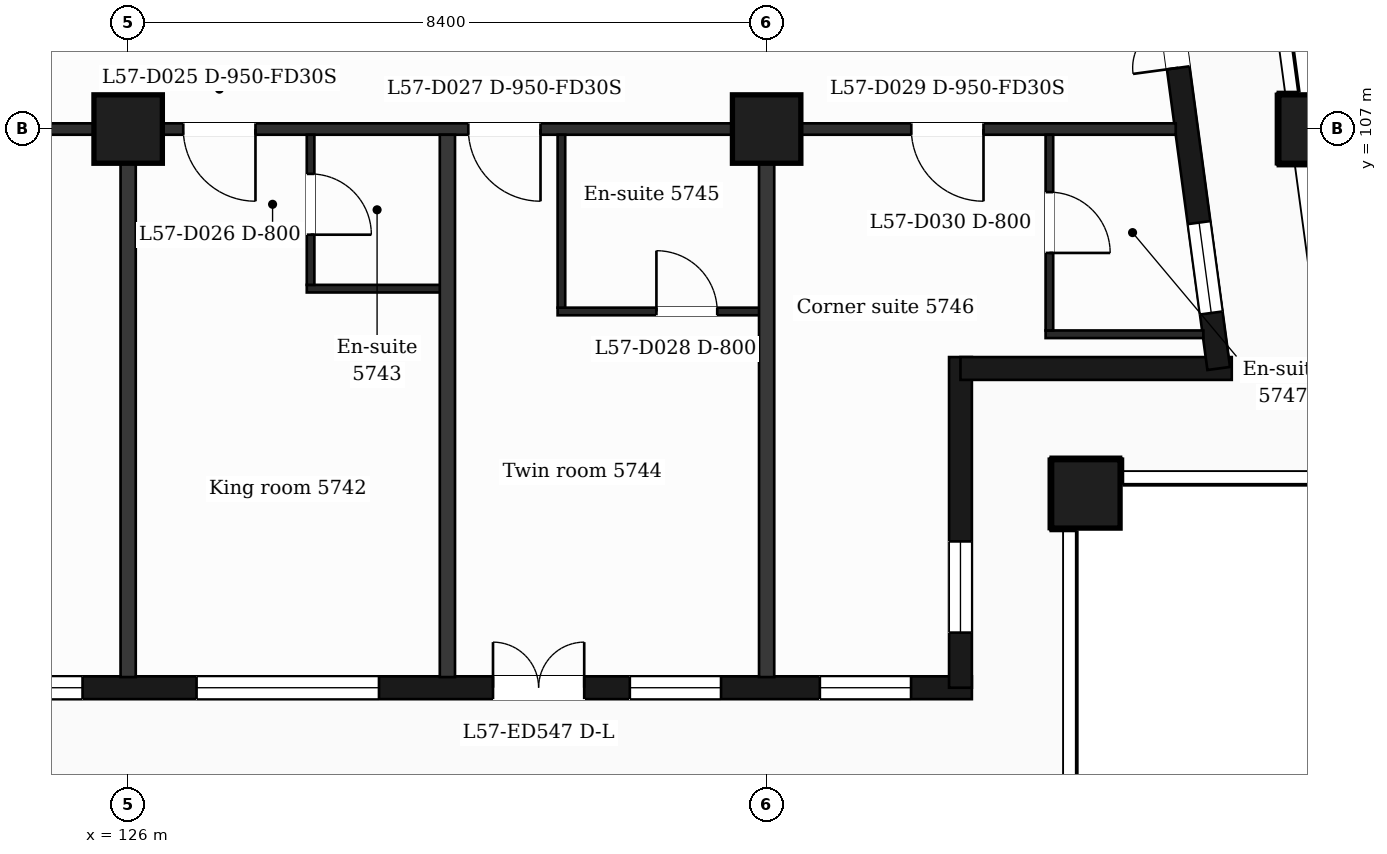
"""IFC4 building model, lengths in metres.
Left out: names, types, materials, properties, quantities, classifications, styles, units other than length and angle.
Written with IfcOpenShell. Run it as: python <this file> out.ifc"""

import sys

from ifc_helpers import new_model, si_unit, direction, frame, frame_2d, origin, origin_2d, place, context, subcontext, project, spatial, rectangle, extrude, element, fill, save


model = new_model("IFC4")
c1 = context("Model", 3, precision=1e-05, world=origin(), true_north=direction((0.0, 1.0)))
c2 = subcontext(c1, "Body", "Model", "MODEL_VIEW")
j1 = project(units=[si_unit("LENGTHUNIT", "METRE"), si_unit("PLANEANGLEUNIT", "RADIAN")], contexts=[c1])
p1 = place(None, origin())
s1 = spatial("IfcSite", under=j1, at=p1, CompositionType="ELEMENT")
p2 = place(p1, origin())
s2 = spatial("IfcBuilding", under=s1, at=p2, CompositionType="ELEMENT")
p3 = place(p2, frame((0.0, 0.0, 235.5)))
s3 = spatial("IfcBuildingStorey", under=s2, at=p3, CompositionType="ELEMENT", Elevation=235.5)
for number, where, z_axis, x_axis in (
    (1, (138.6, 102.2, 0.0), (0.0, 0.0, 1.0), (1.0, 0.0, 0.0)),
    (2, (126.0, 107.0, 0.0), (0.0, 0.0, 1.0), (1.0, 0.0, 0.0)),
    (3, (134.4, 107.0, 0.0), (0.0, 0.0, 1.0), (1.0, 0.0, 0.0)),
    (4, (141.588, 107.0, 0.0), (0.0, 0.0, 1.0), (1.0, 0.0, 0.0)),
):
    element("IfcColumn", number, at=place(p3, frame(where, z_axis=z_axis, x_axis=x_axis)), inside=s3, PredefinedType="COLUMN", context=c2, shape_type="SweptSolid", body=[
        extrude(rectangle(XDim=0.9, YDim=0.9, at=origin_2d()), origin(), (0.0, 0.0, 1.0), 3.7),
    ])
p4 = place(p3, frame((89.85, 99.65, 0.0), z_axis=(0.0, 0.0, 1.0), x_axis=(1.0, 0.0, 0.0)))
e5 = element("IfcWall", 5, at=p4, inside=s3, PredefinedType="SOLIDWALL", context=c2, shape_type="SweptSolid", body=[
    extrude(rectangle(XDim=47.25, YDim=0.3, at=frame_2d((23.625, 0.0))), origin(), (0.0, 0.0, 1.0), 3.38),
])
p5 = place(p4, frame((0.725, 0.0, 0.9)))
e6 = element("IfcOpeningElement", 6, at=p5, cuts=e5, PredefinedType="OPENING", context=c2, shape_type="SweptSolid", body=[
    extrude(rectangle(XDim=1.2, YDim=2.1, at=frame_2d((0.6, 1.05))), frame((0.0, 0.16, 0.0), z_axis=(0.0, -1.0, 0.0), x_axis=(1.0, 0.0, 0.0)), (0.0, 0.0, 1.0), 0.32),
])
p6 = place(p4, frame((3.45, 0.0, 0.9)))
e7 = element("IfcOpeningElement", 7, at=p6, cuts=e5, PredefinedType="OPENING", context=c2, shape_type="SweptSolid", body=[
    extrude(rectangle(XDim=2.4, YDim=2.1, at=frame_2d((1.2, 1.05))), frame((0.0, 0.16, 0.0), z_axis=(0.0, -1.0, 0.0), x_axis=(1.0, 0.0, 0.0)), (0.0, 0.0, 1.0), 0.32),
])
p7 = place(p4, frame((7.65, 0.0, 0.9)))
e8 = element("IfcOpeningElement", 8, at=p7, cuts=e5, PredefinedType="OPENING", context=c2, shape_type="SweptSolid", body=[
    extrude(rectangle(XDim=2.4, YDim=2.1, at=frame_2d((1.2, 1.05))), frame((0.0, 0.16, 0.0), z_axis=(0.0, -1.0, 0.0), x_axis=(1.0, 0.0, 0.0)), (0.0, 0.0, 1.0), 0.32),
])
p8 = place(p4, frame((11.85, 0.0, 0.9)))
e9 = element("IfcOpeningElement", 9, at=p8, cuts=e5, PredefinedType="OPENING", context=c2, shape_type="SweptSolid", body=[
    extrude(rectangle(XDim=2.4, YDim=2.1, at=frame_2d((1.2, 1.05))), frame((0.0, 0.16, 0.0), z_axis=(0.0, -1.0, 0.0), x_axis=(1.0, 0.0, 0.0)), (0.0, 0.0, 1.0), 0.32),
])
p9 = place(p4, frame((16.05, 0.0, 0.9)))
e10 = element("IfcOpeningElement", 10, at=p9, cuts=e5, PredefinedType="OPENING", context=c2, shape_type="SweptSolid", body=[
    extrude(rectangle(XDim=2.4, YDim=2.1, at=frame_2d((1.2, 1.05))), frame((0.0, 0.16, 0.0), z_axis=(0.0, -1.0, 0.0), x_axis=(1.0, 0.0, 0.0)), (0.0, 0.0, 1.0), 0.32),
])
p10 = place(p4, frame((20.25, 0.0, 0.9)))
e11 = element("IfcOpeningElement", 11, at=p10, cuts=e5, PredefinedType="OPENING", context=c2, shape_type="SweptSolid", body=[
    extrude(rectangle(XDim=2.4, YDim=2.1, at=frame_2d((1.2, 1.05))), frame((0.0, 0.16, 0.0), z_axis=(0.0, -1.0, 0.0), x_axis=(1.0, 0.0, 0.0)), (0.0, 0.0, 1.0), 0.32),
])
p11 = place(p4, frame((25.05, 0.0, 0.9)))
e12 = element("IfcOpeningElement", 12, at=p11, cuts=e5, PredefinedType="OPENING", context=c2, shape_type="SweptSolid", body=[
    extrude(rectangle(XDim=1.2, YDim=2.1, at=frame_2d((0.6, 1.05))), frame((0.0, 0.16, 0.0), z_axis=(0.0, -1.0, 0.0), x_axis=(1.0, 0.0, 0.0)), (0.0, 0.0, 1.0), 0.32),
])
p12 = place(p4, frame((29.25, 0.0, 0.9)))
e13 = element("IfcOpeningElement", 13, at=p12, cuts=e5, PredefinedType="OPENING", context=c2, shape_type="SweptSolid", body=[
    extrude(rectangle(XDim=1.2, YDim=2.1, at=frame_2d((0.6, 1.05))), frame((0.0, 0.16, 0.0), z_axis=(0.0, -1.0, 0.0), x_axis=(1.0, 0.0, 0.0)), (0.0, 0.0, 1.0), 0.32),
])
p13 = place(p4, frame((32.55, 0.0, 0.0)))
e14 = element("IfcOpeningElement", 14, at=p13, cuts=e5, PredefinedType="OPENING", context=c2, shape_type="SweptSolid", body=[
    extrude(rectangle(XDim=1.2, YDim=2.4, at=frame_2d((0.6, 1.2))), frame((0.0, 0.16, 0.0), z_axis=(0.0, -1.0, 0.0), x_axis=(1.0, 0.0, 0.0)), (0.0, 0.0, 1.0), 0.32),
])
p14 = place(p4, frame((34.35, 0.0, 0.9)))
e15 = element("IfcOpeningElement", 15, at=p14, cuts=e5, PredefinedType="OPENING", context=c2, shape_type="SweptSolid", body=[
    extrude(rectangle(XDim=1.2, YDim=2.1, at=frame_2d((0.6, 1.05))), frame((0.0, 0.16, 0.0), z_axis=(0.0, -1.0, 0.0), x_axis=(1.0, 0.0, 0.0)), (0.0, 0.0, 1.0), 0.32),
])
p15 = place(p4, frame((37.05, 0.0, 0.9)))
e16 = element("IfcOpeningElement", 16, at=p15, cuts=e5, PredefinedType="OPENING", context=c2, shape_type="SweptSolid", body=[
    extrude(rectangle(XDim=2.4, YDim=2.1, at=frame_2d((1.2, 1.05))), frame((0.0, 0.16, 0.0), z_axis=(0.0, -1.0, 0.0), x_axis=(1.0, 0.0, 0.0)), (0.0, 0.0, 1.0), 0.32),
])
p16 = place(p4, frame((40.95, 0.0, 0.0)))
e17 = element("IfcOpeningElement", 17, at=p16, cuts=e5, PredefinedType="OPENING", context=c2, shape_type="SweptSolid", body=[
    extrude(rectangle(XDim=1.2, YDim=2.4, at=frame_2d((0.6, 1.2))), frame((0.0, 0.16, 0.0), z_axis=(0.0, -1.0, 0.0), x_axis=(1.0, 0.0, 0.0)), (0.0, 0.0, 1.0), 0.32),
])
p17 = place(p4, frame((42.75, 0.0, 0.9)))
e18 = element("IfcOpeningElement", 18, at=p17, cuts=e5, PredefinedType="OPENING", context=c2, shape_type="SweptSolid", body=[
    extrude(rectangle(XDim=1.2, YDim=2.1, at=frame_2d((0.6, 1.05))), frame((0.0, 0.16, 0.0), z_axis=(0.0, -1.0, 0.0), x_axis=(1.0, 0.0, 0.0)), (0.0, 0.0, 1.0), 0.32),
])
p18 = place(p4, frame((45.25, 0.0, 0.9)))
e19 = element("IfcOpeningElement", 19, at=p18, cuts=e5, PredefinedType="OPENING", context=c2, shape_type="SweptSolid", body=[
    extrude(rectangle(XDim=1.2, YDim=2.1, at=frame_2d((0.6, 1.05))), frame((0.0, 0.16, 0.0), z_axis=(0.0, -1.0, 0.0), x_axis=(1.0, 0.0, 0.0)), (0.0, 0.0, 1.0), 0.32),
])
p19 = place(p3, frame((136.95, 99.65, 0.0), z_axis=(0.0, 0.0, 1.0), x_axis=(0.0, 1.0, 0.0)))
e20 = element("IfcWall", 20, at=p19, inside=s3, PredefinedType="SOLIDWALL", context=c2, shape_type="SweptSolid", body=[
    extrude(rectangle(XDim=4.35, YDim=0.3, at=frame_2d((2.175, 0.0))), origin(), (0.0, 0.0, 1.0), 3.38),
])
p20 = place(p19, frame((0.725, 0.0, 0.9)))
e21 = element("IfcOpeningElement", 21, at=p20, cuts=e20, PredefinedType="OPENING", context=c2, shape_type="SweptSolid", body=[
    extrude(rectangle(XDim=1.2, YDim=2.1, at=frame_2d((0.6, 1.05))), frame((0.0, 0.16, 0.0), z_axis=(0.0, -1.0, 0.0), x_axis=(1.0, 0.0, 0.0)), (0.0, 0.0, 1.0), 0.32),
])
p21 = place(p3, frame((136.95, 103.85, 0.0), z_axis=(0.0, 0.0, 1.0), x_axis=(1.0, 0.0, 0.0)))
e22 = element("IfcWall", 22, at=p21, inside=s3, PredefinedType="SOLIDWALL", context=c2, shape_type="SweptSolid", body=[
    extrude(rectangle(XDim=3.569, YDim=0.3, at=frame_2d((1.785, 0.0))), origin(), (0.0, 0.0, 1.0), 3.38),
])
p22 = place(p3, frame((140.348, 103.85, 0.0), z_axis=(0.0, 0.0, 1.0), x_axis=(-0.133431549479, 0.991058031401, 0.0)))
e23 = element("IfcWall", 23, at=p22, inside=s3, PredefinedType="SOLIDWALL", context=c2, shape_type="SweptSolid", body=[
    extrude(rectangle(XDim=6.609, YDim=0.3, at=frame_2d((3.304, 0.0))), origin(), (0.0, 0.0, 1.0), 3.38),
])
p23 = place(p22, frame((0.737, 0.0, 0.9)))
e24 = element("IfcOpeningElement", 24, at=p23, cuts=e23, PredefinedType="OPENING", context=c2, shape_type="SweptSolid", body=[
    extrude(rectangle(XDim=1.2, YDim=2.1, at=frame_2d((0.6, 1.05))), frame((0.0, 0.16, 0.0), z_axis=(0.0, -1.0, 0.0), x_axis=(1.0, 0.0, 0.0)), (0.0, 0.0, 1.0), 0.32),
])
p24 = place(p22, frame((3.991, 0.0, 0.0)))
e25 = element("IfcOpeningElement", 25, at=p24, cuts=e23, PredefinedType="OPENING", context=c2, shape_type="SweptSolid", body=[
    extrude(rectangle(XDim=1.2, YDim=2.4, at=frame_2d((0.6, 1.2))), frame((0.0, 0.16, 0.0), z_axis=(0.0, -1.0, 0.0), x_axis=(1.0, 0.0, 0.0)), (0.0, 0.0, 1.0), 0.32),
])
p25 = place(p3, frame((138.07, 104.3, 0.0), z_axis=(0.0, 0.0, 1.0), x_axis=(1.0, 0.0, 0.0)))
e26 = element("IfcWall", 26, at=p25, inside=s3, PredefinedType="PARTITIONING", context=c2, shape_type="SweptSolid", body=[
    extrude(rectangle(XDim=2.076, YDim=0.1, at=frame_2d((1.038, 0.0))), origin(), (0.0, 0.0, 1.0), 3.38),
])
p26 = place(p3, frame((131.65, 104.6, 0.0), z_axis=(0.0, 0.0, 1.0), x_axis=(1.0, 0.0, 0.0)))
e27 = element("IfcWall", 27, at=p26, inside=s3, PredefinedType="PARTITIONING", context=c2, shape_type="SweptSolid", body=[
    extrude(rectangle(XDim=2.75, YDim=0.1, at=frame_2d((1.375, 0.0))), origin(), (0.0, 0.0, 1.0), 3.38),
])
p27 = place(p26, frame((1.3, 0.0, 0.0)))
e28 = element("IfcOpeningElement", 28, at=p27, cuts=e27, PredefinedType="OPENING", context=c2, shape_type="SweptSolid", body=[
    extrude(rectangle(XDim=0.8, YDim=2.1, at=frame_2d((0.4, 1.05))), frame((0.0, 0.06, 0.0), z_axis=(0.0, -1.0, 0.0), x_axis=(1.0, 0.0, 0.0)), (0.0, 0.0, 1.0), 0.12),
])
p28 = place(p3, frame((128.35, 104.9, 0.0), z_axis=(0.0, 0.0, 1.0), x_axis=(1.0, 0.0, 0.0)))
e29 = element("IfcWall", 29, at=p28, inside=s3, PredefinedType="PARTITIONING", context=c2, shape_type="SweptSolid", body=[
    extrude(rectangle(XDim=1.85, YDim=0.1, at=frame_2d((0.925, 0.0))), origin(), (0.0, 0.0, 1.0), 3.38),
])
p29 = place(p3, frame((87.018, 107.0, 0.0), z_axis=(0.0, 0.0, 1.0), x_axis=(1.0, 0.0, 0.0)))
e30 = element("IfcWall", 30, at=p29, inside=s3, PredefinedType="PARTITIONING", context=c2, shape_type="SweptSolid", body=[
    extrude(rectangle(XDim=52.765, YDim=0.15, at=frame_2d((26.382, 0.0))), origin(), (0.0, 0.0, 1.0), 3.38),
])
p30 = place(p29, frame((0.707, 0.0, 0.0)))
e31 = element("IfcOpeningElement", 31, at=p30, cuts=e30, PredefinedType="OPENING", context=c2, shape_type="SweptSolid", body=[
    extrude(rectangle(XDim=0.95, YDim=2.1, at=frame_2d((0.475, 1.05))), frame((0.0, 0.085, 0.0), z_axis=(0.0, -1.0, 0.0), x_axis=(1.0, 0.0, 0.0)), (0.0, 0.0, 1.0), 0.17),
])
p31 = place(p29, frame((8.412, 0.0, 0.0)))
e32 = element("IfcOpeningElement", 32, at=p31, cuts=e30, PredefinedType="OPENING", context=c2, shape_type="SweptSolid", body=[
    extrude(rectangle(XDim=1.0, YDim=2.1, at=frame_2d((0.5, 1.05))), frame((0.0, 0.085, 0.0), z_axis=(0.0, -1.0, 0.0), x_axis=(1.0, 0.0, 0.0)), (0.0, 0.0, 1.0), 0.17),
])
p32 = place(p29, frame((20.482, 0.0, 0.0)))
e33 = element("IfcOpeningElement", 33, at=p32, cuts=e30, PredefinedType="OPENING", context=c2, shape_type="SweptSolid", body=[
    extrude(rectangle(XDim=1.0, YDim=2.1, at=frame_2d((0.5, 1.05))), frame((0.0, 0.085, 0.0), z_axis=(0.0, -1.0, 0.0), x_axis=(1.0, 0.0, 0.0)), (0.0, 0.0, 1.0), 0.17),
])
p33 = place(p29, frame((22.882, 0.0, 0.0)))
e34 = element("IfcOpeningElement", 34, at=p33, cuts=e30, PredefinedType="OPENING", context=c2, shape_type="SweptSolid", body=[
    extrude(rectangle(XDim=1.0, YDim=2.1, at=frame_2d((0.5, 1.05))), frame((0.0, 0.085, 0.0), z_axis=(0.0, -1.0, 0.0), x_axis=(1.0, 0.0, 0.0)), (0.0, 0.0, 1.0), 0.17),
])
p34 = place(p29, frame((32.607, 0.0, 0.0)))
e35 = element("IfcOpeningElement", 35, at=p34, cuts=e30, PredefinedType="OPENING", context=c2, shape_type="SweptSolid", body=[
    extrude(rectangle(XDim=1.0, YDim=2.1, at=frame_2d((0.5, 1.05))), frame((0.0, 0.085, 0.0), z_axis=(0.0, -1.0, 0.0), x_axis=(1.0, 0.0, 0.0)), (0.0, 0.0, 1.0), 0.17),
])
p35 = place(p29, frame((39.707, 0.0, 0.0)))
e36 = element("IfcOpeningElement", 36, at=p35, cuts=e30, PredefinedType="OPENING", context=c2, shape_type="SweptSolid", body=[
    extrude(rectangle(XDim=0.95, YDim=2.1, at=frame_2d((0.475, 1.05))), frame((0.0, 0.085, 0.0), z_axis=(0.0, -1.0, 0.0), x_axis=(1.0, 0.0, 0.0)), (0.0, 0.0, 1.0), 0.17),
])
p36 = place(p29, frame((43.457, 0.0, 0.0)))
e37 = element("IfcOpeningElement", 37, at=p36, cuts=e30, PredefinedType="OPENING", context=c2, shape_type="SweptSolid", body=[
    extrude(rectangle(XDim=0.95, YDim=2.1, at=frame_2d((0.475, 1.05))), frame((0.0, 0.085, 0.0), z_axis=(0.0, -1.0, 0.0), x_axis=(1.0, 0.0, 0.0)), (0.0, 0.0, 1.0), 0.17),
])
p37 = place(p29, frame((49.285, 0.0, 0.0)))
e38 = element("IfcOpeningElement", 38, at=p37, cuts=e30, PredefinedType="OPENING", context=c2, shape_type="SweptSolid", body=[
    extrude(rectangle(XDim=0.95, YDim=2.1, at=frame_2d((0.475, 1.05))), frame((0.0, 0.085, 0.0), z_axis=(0.0, -1.0, 0.0), x_axis=(1.0, 0.0, 0.0)), (0.0, 0.0, 1.0), 0.17),
])
p38 = place(p3, frame((126.0, 99.79, 0.0), z_axis=(0.0, 0.0, 1.0), x_axis=(0.0, 1.0, 0.0)))
e39 = element("IfcWall", 39, at=p38, inside=s3, PredefinedType="PARTITIONING", context=c2, shape_type="SweptSolid", body=[
    extrude(rectangle(XDim=7.135, YDim=0.2, at=frame_2d((3.567, 0.0))), origin(), (0.0, 0.0, 1.0), 3.38),
])
p39 = place(p3, frame((128.4, 104.95, 0.0), z_axis=(0.0, 0.0, 1.0), x_axis=(0.0, 1.0, 0.0)))
e40 = element("IfcWall", 40, at=p39, inside=s3, PredefinedType="PARTITIONING", context=c2, shape_type="SweptSolid", body=[
    extrude(rectangle(XDim=1.975, YDim=0.1, at=frame_2d((0.988, 0.0))), origin(), (0.0, 0.0, 1.0), 3.38),
])
p40 = place(p39, frame((0.66, 0.0, 0.0)))
e41 = element("IfcOpeningElement", 41, at=p40, cuts=e40, PredefinedType="OPENING", context=c2, shape_type="SweptSolid", body=[
    extrude(rectangle(XDim=0.8, YDim=2.1, at=frame_2d((0.4, 1.05))), frame((0.0, 0.06, 0.0), z_axis=(0.0, -1.0, 0.0), x_axis=(1.0, 0.0, 0.0)), (0.0, 0.0, 1.0), 0.12),
])
p41 = place(p3, frame((130.2, 99.79, 0.0), z_axis=(0.0, 0.0, 1.0), x_axis=(0.0, 1.0, 0.0)))
e42 = element("IfcWall", 42, at=p41, inside=s3, PredefinedType="PARTITIONING", context=c2, shape_type="SweptSolid", body=[
    extrude(rectangle(XDim=7.135, YDim=0.2, at=frame_2d((3.567, 0.0))), origin(), (0.0, 0.0, 1.0), 3.38),
])
p42 = place(p3, frame((131.7, 104.65, 0.0), z_axis=(0.0, 0.0, 1.0), x_axis=(0.0, 1.0, 0.0)))
e43 = element("IfcWall", 43, at=p42, inside=s3, PredefinedType="PARTITIONING", context=c2, shape_type="SweptSolid", body=[
    extrude(rectangle(XDim=2.275, YDim=0.1, at=frame_2d((1.138, 0.0))), origin(), (0.0, 0.0, 1.0), 3.38),
])
p43 = place(p3, frame((134.4, 99.79, 0.0), z_axis=(0.0, 0.0, 1.0), x_axis=(0.0, 1.0, 0.0)))
e44 = element("IfcWall", 44, at=p43, inside=s3, PredefinedType="PARTITIONING", context=c2, shape_type="SweptSolid", body=[
    extrude(rectangle(XDim=7.135, YDim=0.2, at=frame_2d((3.567, 0.0))), origin(), (0.0, 0.0, 1.0), 3.38),
])
p44 = place(p3, frame((138.12, 104.35, 0.0), z_axis=(0.0, 0.0, 1.0), x_axis=(0.0, 1.0, 0.0)))
e45 = element("IfcWall", 45, at=p44, inside=s3, PredefinedType="PARTITIONING", context=c2, shape_type="SweptSolid", body=[
    extrude(rectangle(XDim=2.575, YDim=0.1, at=frame_2d((1.288, 0.0))), origin(), (0.0, 0.0, 1.0), 3.38),
])
p45 = place(p44, frame((1.02, 0.0, 0.0)))
e46 = element("IfcOpeningElement", 46, at=p45, cuts=e45, PredefinedType="OPENING", context=c2, shape_type="SweptSolid", body=[
    extrude(rectangle(XDim=0.8, YDim=2.1, at=frame_2d((0.4, 1.05))), frame((0.0, 0.06, 0.0), z_axis=(0.0, -1.0, 0.0), x_axis=(1.0, 0.0, 0.0)), (0.0, 0.0, 1.0), 0.12),
])
p46 = place(p14, origin())
e47 = element("IfcWindow", 47, at=p46, inside=s3, PartitioningType="SINGLE_PANEL", PredefinedType="WINDOW", context=c2, shape_type="SweptSolid", body=[
    extrude(rectangle(XDim=1.2, YDim=2.1, at=frame_2d((0.6, 1.05))), frame((0.0, 0.03, 0.0), z_axis=(0.0, -1.0, 0.0), x_axis=(1.0, 0.0, 0.0)), (0.0, 0.0, 1.0), 0.06),
])
fill(e15, e47)
p47 = place(p15, origin())
e48 = element("IfcWindow", 48, at=p47, inside=s3, PartitioningType="SINGLE_PANEL", PredefinedType="WINDOW", context=c2, shape_type="SweptSolid", body=[
    extrude(rectangle(XDim=2.4, YDim=2.1, at=frame_2d((1.2, 1.05))), frame((0.0, 0.03, 0.0), z_axis=(0.0, -1.0, 0.0), x_axis=(1.0, 0.0, 0.0)), (0.0, 0.0, 1.0), 0.06),
])
fill(e16, e48)
p48 = place(p16, origin())
e49 = element("IfcDoor", 49, at=p48, inside=s3, OperationType="DOUBLE_DOOR_SINGLE_SWING", PredefinedType="DOOR", context=c2, shape_type="SweptSolid", body=[
    extrude(rectangle(XDim=1.2, YDim=2.4, at=frame_2d((0.6, 1.2))), frame((0.0, 0.025, 0.0), z_axis=(0.0, -1.0, 0.0), x_axis=(1.0, 0.0, 0.0)), (0.0, 0.0, 1.0), 0.05),
])
fill(e17, e49)
p49 = place(p17, origin())
e50 = element("IfcWindow", 50, at=p49, inside=s3, PartitioningType="SINGLE_PANEL", PredefinedType="WINDOW", context=c2, shape_type="SweptSolid", body=[
    extrude(rectangle(XDim=1.2, YDim=2.1, at=frame_2d((0.6, 1.05))), frame((0.0, 0.03, 0.0), z_axis=(0.0, -1.0, 0.0), x_axis=(1.0, 0.0, 0.0)), (0.0, 0.0, 1.0), 0.06),
])
fill(e18, e50)
p50 = place(p18, origin())
e51 = element("IfcWindow", 51, at=p50, inside=s3, PartitioningType="SINGLE_PANEL", PredefinedType="WINDOW", context=c2, shape_type="SweptSolid", body=[
    extrude(rectangle(XDim=1.2, YDim=2.1, at=frame_2d((0.6, 1.05))), frame((0.0, 0.03, 0.0), z_axis=(0.0, -1.0, 0.0), x_axis=(1.0, 0.0, 0.0)), (0.0, 0.0, 1.0), 0.06),
])
fill(e19, e51)
p51 = place(p20, origin())
e52 = element("IfcWindow", 52, at=p51, inside=s3, PartitioningType="SINGLE_PANEL", PredefinedType="WINDOW", context=c2, shape_type="SweptSolid", body=[
    extrude(rectangle(XDim=1.2, YDim=2.1, at=frame_2d((0.6, 1.05))), frame((0.0, 0.03, 0.0), z_axis=(0.0, -1.0, 0.0), x_axis=(1.0, 0.0, 0.0)), (0.0, 0.0, 1.0), 0.06),
])
fill(e21, e52)
p52 = place(p23, origin())
e53 = element("IfcWindow", 53, at=p52, inside=s3, PartitioningType="SINGLE_PANEL", PredefinedType="WINDOW", context=c2, shape_type="SweptSolid", body=[
    extrude(rectangle(XDim=1.2, YDim=2.1, at=frame_2d((0.6, 1.05))), frame((0.0, 0.03, 0.0), z_axis=(0.0, -1.0, 0.0), x_axis=(1.0, 0.0, 0.0)), (0.0, 0.0, 1.0), 0.06),
])
fill(e24, e53)
p53 = place(p24, origin())
e54 = element("IfcDoor", 54, at=p53, inside=s3, OperationType="DOUBLE_DOOR_SINGLE_SWING", PredefinedType="DOOR", context=c2, shape_type="SweptSolid", body=[
    extrude(rectangle(XDim=1.2, YDim=2.4, at=frame_2d((0.6, 1.2))), frame((0.0, 0.025, 0.0), z_axis=(0.0, -1.0, 0.0), x_axis=(1.0, 0.0, 0.0)), (0.0, 0.0, 1.0), 0.05),
])
fill(e25, e54)
p54 = place(p35, origin())
e55 = element("IfcDoor", 55, at=p54, inside=s3, OperationType="SINGLE_SWING_RIGHT", PredefinedType="DOOR", context=c2, shape_type="SweptSolid", body=[
    extrude(rectangle(XDim=0.95, YDim=2.1, at=frame_2d((0.475, 1.05))), frame((0.0, 0.025, 0.0), z_axis=(0.0, -1.0, 0.0), x_axis=(1.0, 0.0, 0.0)), (0.0, 0.0, 1.0), 0.05),
])
fill(e36, e55)
p55 = place(p40, origin())
e56 = element("IfcDoor", 56, at=p55, inside=s3, OperationType="SINGLE_SWING_LEFT", PredefinedType="DOOR", context=c2, shape_type="SweptSolid", body=[
    extrude(rectangle(XDim=0.8, YDim=2.1, at=frame_2d((0.4, 1.05))), frame((0.0, 0.025, 0.0), z_axis=(0.0, -1.0, 0.0), x_axis=(1.0, 0.0, 0.0)), (0.0, 0.0, 1.0), 0.05),
])
fill(e41, e56)
p56 = place(p36, origin())
e57 = element("IfcDoor", 57, at=p56, inside=s3, OperationType="SINGLE_SWING_RIGHT", PredefinedType="DOOR", context=c2, shape_type="SweptSolid", body=[
    extrude(rectangle(XDim=0.95, YDim=2.1, at=frame_2d((0.475, 1.05))), frame((0.0, 0.025, 0.0), z_axis=(0.0, -1.0, 0.0), x_axis=(1.0, 0.0, 0.0)), (0.0, 0.0, 1.0), 0.05),
])
fill(e37, e57)
p57 = place(p27, origin())
e58 = element("IfcDoor", 58, at=p57, inside=s3, OperationType="SINGLE_SWING_LEFT", PredefinedType="DOOR", context=c2, shape_type="SweptSolid", body=[
    extrude(rectangle(XDim=0.8, YDim=2.1, at=frame_2d((0.4, 1.05))), frame((0.0, 0.025, 0.0), z_axis=(0.0, -1.0, 0.0), x_axis=(1.0, 0.0, 0.0)), (0.0, 0.0, 1.0), 0.05),
])
fill(e28, e58)
p58 = place(p37, origin())
e59 = element("IfcDoor", 59, at=p58, inside=s3, OperationType="SINGLE_SWING_RIGHT", PredefinedType="DOOR", context=c2, shape_type="SweptSolid", body=[
    extrude(rectangle(XDim=0.95, YDim=2.1, at=frame_2d((0.475, 1.05))), frame((0.0, 0.025, 0.0), z_axis=(0.0, -1.0, 0.0), x_axis=(1.0, 0.0, 0.0)), (0.0, 0.0, 1.0), 0.05),
])
fill(e38, e59)
p59 = place(p45, origin())
e60 = element("IfcDoor", 60, at=p59, inside=s3, OperationType="SINGLE_SWING_LEFT", PredefinedType="DOOR", context=c2, shape_type="SweptSolid", body=[
    extrude(rectangle(XDim=0.8, YDim=2.1, at=frame_2d((0.4, 1.05))), frame((0.0, 0.025, 0.0), z_axis=(0.0, -1.0, 0.0), x_axis=(1.0, 0.0, 0.0)), (0.0, 0.0, 1.0), 0.05),
])
fill(e46, e60)
save(model, sys.argv[1])
